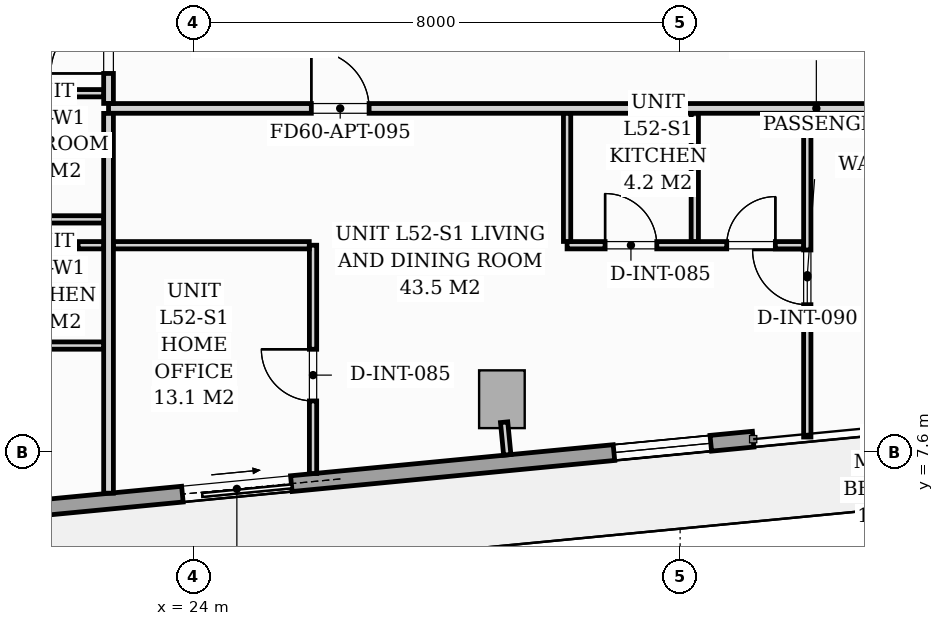
"""IFC4 building model, lengths in metres.
Left out: names, types, materials, properties, quantities, classifications, styles, units other than length and angle.
Written with IfcOpenShell. Run it as: python <this file> out.ifc"""

import sys

from ifc_helpers import new_model, si_unit, direction, frame, frame_2d, origin, origin_2d, place, context, subcontext, project, spatial, rectangle, extrude, source, transform, mapped, element, fill, save


model = new_model("IFC4")
c1 = context("Model", 3, precision=1e-05, world=origin(), true_north=direction((0.0, 1.0)))
c2 = subcontext(c1, "Body", "Model", "MODEL_VIEW")
j1 = project(units=[si_unit("LENGTHUNIT", "METRE"), si_unit("PLANEANGLEUNIT", "RADIAN")], contexts=[c1])
p1 = place(None, origin())
s1 = spatial("IfcSite", under=j1, at=p1, CompositionType="ELEMENT")
p2 = place(p1, origin())
s2 = spatial("IfcBuilding", under=s1, at=p2, CompositionType="ELEMENT")
p3 = place(p2, frame((0.0, 0.0, 182.6)))
s3 = spatial("IfcBuildingStorey", under=s2, at=p3, CompositionType="ELEMENT", Elevation=182.6)
m1 = source(origin(), c2, "Body", "SweptSolid", [
    extrude(rectangle(XDim=0.75, YDim=0.95, at=origin_2d()), origin(), (0.0, 0.0, 1.0), 3.196),
])
p4 = place(p3, frame((29.069, 8.467, 0.002), z_axis=(0.0, 0.0, 1.0), x_axis=(0.995396198367, 0.09584575252, 0.0)))
e1 = element("IfcColumn", 1, at=p4, inside=s3, PredefinedType="COLUMN", context=c2, shape_type="MappedRepresentation", body=[
    mapped(m1, transform((0.0, 0.0, 0.0), scale=1.0)),
])
p5 = place(p3, frame((33.201, 7.81, 0.0), z_axis=(0.0, 0.0, 1.0), x_axis=(-0.995397074604, -0.095836652014, 0.0)))
e2 = element("IfcWall", 2, at=p5, inside=s3, PredefinedType="STANDARD", context=c2, shape_type="SweptSolid", body=[
    extrude(rectangle(XDim=16.1, YDim=0.26, at=frame_2d((8.05, 0.0))), origin(), (0.0, 0.0, 1.0), 2.94),
])
p6 = place(p5, frame((7.63, 0.0, 0.0)))
e3 = element("IfcOpeningElement", 3, at=p6, cuts=e2, PredefinedType="OPENING", context=c2, shape_type="SweptSolid", body=[
    extrude(rectangle(XDim=1.8, YDim=2.06, at=frame_2d((0.9, 1.03))), frame((0.0, 0.14, 0.0), z_axis=(0.0, -1.0, 0.0), x_axis=(1.0, 0.0, 0.0)), (0.0, 0.0, 1.0), 0.28),
])
p7 = place(p5, frame((0.7, 0.0, 0.65)))
e4 = element("IfcOpeningElement", 4, at=p7, cuts=e2, PredefinedType="OPENING", context=c2, shape_type="SweptSolid", body=[
    extrude(rectangle(XDim=1.6, YDim=1.5, at=frame_2d((0.8, 0.75))), frame((0.0, 0.14, 0.0), z_axis=(0.0, -1.0, 0.0), x_axis=(1.0, 0.0, 0.0)), (0.0, 0.0, 1.0), 0.28),
])
p8 = place(p3, frame((22.6, 13.25, 0.0), z_axis=(0.0, 0.0, 1.0), x_axis=(1.0, 0.0, 0.0)))
e5 = element("IfcWall", 5, at=p8, inside=s3, PredefinedType="PARTITIONING", context=c2, shape_type="SweptSolid", body=[
    extrude(rectangle(XDim=23.28, YDim=0.16, at=frame_2d((11.64, 0.0))), origin(), (0.0, 0.0, 1.0), 2.94),
])
p9 = place(p8, frame((3.335, 0.0, 0.0)))
e6 = element("IfcOpeningElement", 6, at=p9, cuts=e5, PredefinedType="OPENING", context=c2, shape_type="SweptSolid", body=[
    extrude(rectangle(XDim=0.95, YDim=2.06, at=frame_2d((0.475, 1.03))), frame((0.0, 0.09, 0.0), z_axis=(0.0, -1.0, 0.0), x_axis=(1.0, 0.0, 0.0)), (0.0, 0.0, 1.0), 0.18),
])
p10 = place(p8, frame((15.096, 0.0, 0.0)))
e7 = element("IfcOpeningElement", 7, at=p10, cuts=e5, PredefinedType="OPENING", context=c2, shape_type="SweptSolid", body=[
    extrude(rectangle(XDim=0.95, YDim=2.06, at=frame_2d((0.475, 1.03))), frame((0.0, 0.09, 0.0), z_axis=(0.0, -1.0, 0.0), x_axis=(1.0, 0.0, 0.0)), (0.0, 0.0, 1.0), 0.18),
])
p11 = place(p3, frame((22.6, 6.922, 0.0), z_axis=(0.0, 0.0, 1.0), x_axis=(0.0, 1.0, 0.0)))
e8 = element("IfcWall", 8, at=p11, inside=s3, PredefinedType="PARTITIONING", context=c2, shape_type="SweptSolid", body=[
    extrude(rectangle(XDim=6.246, YDim=0.16, at=frame_2d((3.123, 0.0))), origin(), (0.0, 0.0, 1.0), 2.94),
])
p12 = place(p3, frame((22.6, 13.332, 0.0), z_axis=(0.0, 0.0, 1.0), x_axis=(0.0, 1.0, 0.0)))
e9 = element("IfcWall", 9, at=p12, inside=s3, PredefinedType="PARTITIONING", context=c2, shape_type="SweptSolid", body=[
    extrude(rectangle(XDim=11.549, YDim=0.16, at=frame_2d((5.774, 0.0))), origin(), (0.0, 0.0, 1.0), 2.94),
])
p13 = place(p12, frame((0.493, 0.0, 0.0)))
e10 = element("IfcOpeningElement", 10, at=p13, cuts=e9, PredefinedType="OPENING", context=c2, shape_type="SweptSolid", body=[
    extrude(rectangle(XDim=0.95, YDim=2.06, at=frame_2d((0.475, 1.03))), frame((0.0, 0.09, 0.0), z_axis=(0.0, -1.0, 0.0), x_axis=(1.0, 0.0, 0.0)), (0.0, 0.0, 1.0), 0.18),
])
p14 = place(p12, frame((4.713, 0.0, 0.0)))
e11 = element("IfcOpeningElement", 11, at=p14, cuts=e9, PredefinedType="OPENING", context=c2, shape_type="SweptSolid", body=[
    extrude(rectangle(XDim=0.95, YDim=2.06, at=frame_2d((0.475, 1.03))), frame((0.0, 0.09, 0.0), z_axis=(0.0, -1.0, 0.0), x_axis=(1.0, 0.0, 0.0)), (0.0, 0.0, 1.0), 0.18),
])
p15 = place(p3, frame((34.091, 7.846, 0.0), z_axis=(0.0, 0.0, 1.0), x_axis=(0.0, 1.0, 0.0)))
e12 = element("IfcWall", 12, at=p15, inside=s3, PredefinedType="PARTITIONING", context=c2, shape_type="SweptSolid", body=[
    extrude(rectangle(XDim=5.322, YDim=0.12, at=frame_2d((2.661, 0.0))), origin(), (0.0, 0.0, 1.0), 2.94),
])
p16 = place(p15, frame((2.176, 0.0, 0.0)))
e13 = element("IfcOpeningElement", 13, at=p16, cuts=e12, PredefinedType="OPENING", context=c2, shape_type="SweptSolid", body=[
    extrude(rectangle(XDim=0.9, YDim=2.05, at=frame_2d((0.45, 1.025))), frame((0.0, 0.07, 0.0), z_axis=(0.0, -1.0, 0.0), x_axis=(1.0, 0.0, 0.0)), (0.0, 0.0, 1.0), 0.14),
])
p17 = place(p3, frame((30.141, 11.0, 0.0), z_axis=(0.0, 0.0, 1.0), x_axis=(1.0, 0.0, 0.0)))
e14 = element("IfcWall", 14, at=p17, inside=s3, PredefinedType="PARTITIONING", context=c2, shape_type="SweptSolid", body=[
    extrude(rectangle(XDim=3.888, YDim=0.12, at=frame_2d((1.944, 0.0))), origin(), (0.0, 0.0, 1.0), 2.94),
])
p18 = place(p17, frame((0.625, 0.0, 0.0)))
e15 = element("IfcOpeningElement", 15, at=p18, cuts=e14, PredefinedType="OPENING", context=c2, shape_type="SweptSolid", body=[
    extrude(rectangle(XDim=0.85, YDim=2.05, at=frame_2d((0.425, 1.025))), frame((0.0, 0.07, 0.0), z_axis=(0.0, -1.0, 0.0), x_axis=(1.0, 0.0, 0.0)), (0.0, 0.0, 1.0), 0.14),
])
p19 = place(p17, frame((2.625, 0.0, 0.0)))
e16 = element("IfcOpeningElement", 16, at=p19, cuts=e14, PredefinedType="OPENING", context=c2, shape_type="SweptSolid", body=[
    extrude(rectangle(XDim=0.8, YDim=2.02, at=frame_2d((0.4, 1.01))), frame((0.0, 0.07, 0.0), z_axis=(0.0, -1.0, 0.0), x_axis=(1.0, 0.0, 0.0)), (0.0, 0.0, 1.0), 0.14),
])
for number, where, z_axis, x_axis in (
    (17, (32.241, 11.062, 0.0), (0.0, 0.0, 1.0), (0.0, 1.0, 0.0)),
    (18, (30.141, 11.062, 0.0), (0.0, 0.0, 1.0), (0.0, 1.0, 0.0)),
):
    element("IfcWall", number, at=place(p3, frame(where, z_axis=z_axis, x_axis=x_axis)), inside=s3, PredefinedType="PARTITIONING", context=c2, shape_type="SweptSolid", body=[
        extrude(rectangle(XDim=2.106, YDim=0.12, at=frame_2d((1.053, 0.0))), origin(), (0.0, 0.0, 1.0), 2.94),
    ])
p20 = place(p3, frame((25.963, 7.246, 0.0), z_axis=(0.0, 0.0, 1.0), x_axis=(0.0, 1.0, 0.0)))
e19 = element("IfcWall", 19, at=p20, inside=s3, PredefinedType="PARTITIONING", context=c2, shape_type="SweptSolid", body=[
    extrude(rectangle(XDim=3.754, YDim=0.12, at=frame_2d((1.877, 0.0))), origin(), (0.0, 0.0, 1.0), 2.94),
])
p21 = place(p20, frame((1.193, 0.0, 0.0)))
e20 = element("IfcOpeningElement", 20, at=p21, cuts=e19, PredefinedType="OPENING", context=c2, shape_type="SweptSolid", body=[
    extrude(rectangle(XDim=0.85, YDim=2.05, at=frame_2d((0.425, 1.025))), frame((0.0, 0.07, 0.0), z_axis=(0.0, -1.0, 0.0), x_axis=(1.0, 0.0, 0.0)), (0.0, 0.0, 1.0), 0.14),
])
p22 = place(p3, frame((22.1, 11.0, 0.0), z_axis=(0.0, 0.0, 1.0), x_axis=(1.0, 0.0, 0.0)))
e21 = element("IfcWall", 21, at=p22, inside=s3, PredefinedType="PARTITIONING", context=c2, shape_type="SweptSolid", body=[
    extrude(rectangle(XDim=0.418, YDim=0.12, at=frame_2d((0.209, 0.0))), origin(), (0.0, 0.0, 1.0), 2.94),
])
p23 = place(p3, frame((22.682, 11.0, 0.0), z_axis=(0.0, 0.0, 1.0), x_axis=(1.0, 0.0, 0.0)))
e22 = element("IfcWall", 22, at=p23, inside=s3, PredefinedType="PARTITIONING", context=c2, shape_type="SweptSolid", body=[
    extrude(rectangle(XDim=3.219, YDim=0.12, at=frame_2d((1.609, 0.0))), origin(), (0.0, 0.0, 1.0), 2.94),
])
for number, where, z_axis, x_axis in (
    (23, (20.262, 11.425, 0.0), (0.0, 0.0, 1.0), (1.0, 0.0, 0.0)),
    (24, (20.262, 9.35, 0.0), (0.0, 0.0, 1.0), (1.0, 0.0, 0.0)),
    (25, (20.262, 13.5, 0.0), (0.0, 0.0, 1.0), (1.0, 0.0, 0.0)),
):
    element("IfcWall", number, at=place(p3, frame(where, z_axis=z_axis, x_axis=x_axis)), inside=s3, PredefinedType="PARTITIONING", context=c2, shape_type="SweptSolid", body=[
        extrude(rectangle(XDim=2.256, YDim=0.12, at=frame_2d((1.128, 0.0))), origin(), (0.0, 0.0, 1.0), 2.94),
    ])
p24 = place(p3, frame((29.105, 8.089, 0.0), z_axis=(0.0, 0.0, 1.0), x_axis=(0.095772948675, -0.995403205893, 0.0)))
e26 = element("IfcWall", 26, at=p24, inside=s3, PredefinedType="PARTITIONING", context=c2, shape_type="SweptSolid", body=[
    extrude(rectangle(XDim=0.538, YDim=0.12, at=frame_2d((0.269, 0.0))), origin(), (0.0, 0.0, 1.0), 2.94),
])
m2 = source(origin(), c2, "Body", "SweptSolid", [
    extrude(rectangle(XDim=1.8, YDim=2.06, at=frame_2d((0.9, 1.03))), frame((0.0, 0.025, 0.0), z_axis=(0.0, -1.0, 0.0), x_axis=(1.0, 0.0, 0.0)), (0.0, 0.0, 1.0), 0.05),
])
p25 = place(p6, origin())
e27 = element("IfcDoor", 27, at=p25, inside=s3, OperationType="SLIDING_TO_LEFT", PredefinedType="DOOR", context=c2, shape_type="MappedRepresentation", body=[
    mapped(m2, transform((0.0, 0.0, 0.0), scale=1.0)),
])
fill(e3, e27)
m3 = source(origin(), c2, "Body", "SweptSolid", [
    extrude(rectangle(XDim=1.6, YDim=1.5, at=frame_2d((0.8, 0.75))), frame((0.0, 0.03, 0.0), z_axis=(0.0, -1.0, 0.0), x_axis=(1.0, 0.0, 0.0)), (0.0, 0.0, 1.0), 0.06),
])
p26 = place(p7, origin())
e28 = element("IfcWindow", 28, at=p26, inside=s3, PartitioningType="SINGLE_PANEL", PredefinedType="WINDOW", context=c2, shape_type="MappedRepresentation", body=[
    mapped(m3, transform((0.0, 0.0, 0.0), scale=1.0)),
])
fill(e4, e28)
m4 = source(origin(), c2, "Body", "SweptSolid", [
    extrude(rectangle(XDim=0.85, YDim=2.05, at=frame_2d((0.425, 1.025))), frame((0.0, 0.025, 0.0), z_axis=(0.0, -1.0, 0.0), x_axis=(1.0, 0.0, 0.0)), (0.0, 0.0, 1.0), 0.05),
])
p27 = place(p21, origin())
e29 = element("IfcDoor", 29, at=p27, inside=s3, OperationType="SINGLE_SWING_RIGHT", PredefinedType="DOOR", context=c2, shape_type="MappedRepresentation", body=[
    mapped(m4, transform((0.0, 0.0, 0.0), scale=1.0)),
])
fill(e20, e29)
m5 = source(origin(), c2, "Body", "SweptSolid", [
    extrude(rectangle(XDim=0.95, YDim=2.06, at=frame_2d((0.475, 1.03))), frame((0.0, 0.025, 0.0), z_axis=(0.0, -1.0, 0.0), x_axis=(1.0, 0.0, 0.0)), (0.0, 0.0, 1.0), 0.05),
])
p28 = place(p9, origin())
e30 = element("IfcDoor", 30, at=p28, inside=s3, OperationType="SINGLE_SWING_LEFT", PredefinedType="DOOR", context=c2, shape_type="MappedRepresentation", body=[
    mapped(m5, transform((0.0, 0.0, 0.0), scale=1.0)),
])
fill(e6, e30)
m6 = source(origin(), c2, "Body", "SweptSolid", [
    extrude(rectangle(XDim=0.9, YDim=2.05, at=frame_2d((0.45, 1.025))), frame((0.0, 0.025, 0.0), z_axis=(0.0, -1.0, 0.0), x_axis=(1.0, 0.0, 0.0)), (0.0, 0.0, 1.0), 0.05),
])
p29 = place(p16, origin())
e31 = element("IfcDoor", 31, at=p29, inside=s3, OperationType="SINGLE_SWING_RIGHT", PredefinedType="DOOR", context=c2, shape_type="MappedRepresentation", body=[
    mapped(m6, transform((0.0, 0.0, 0.0), scale=1.0)),
])
fill(e13, e31)
p30 = place(p18, origin())
e32 = element("IfcDoor", 32, at=p30, inside=s3, OperationType="SINGLE_SWING_LEFT", PredefinedType="DOOR", context=c2, shape_type="MappedRepresentation", body=[
    mapped(m4, transform((0.0, 0.0, 0.0), scale=1.0)),
])
fill(e15, e32)
m7 = source(origin(), c2, "Body", "SweptSolid", [
    extrude(rectangle(XDim=0.8, YDim=2.02, at=frame_2d((0.4, 1.01))), frame((0.0, 0.025, 0.0), z_axis=(0.0, -1.0, 0.0), x_axis=(1.0, 0.0, 0.0)), (0.0, 0.0, 1.0), 0.05),
])
p31 = place(p19, origin())
e33 = element("IfcDoor", 33, at=p31, inside=s3, OperationType="SINGLE_SWING_RIGHT", PredefinedType="DOOR", context=c2, shape_type="MappedRepresentation", body=[
    mapped(m7, transform((0.0, 0.0, 0.0), scale=1.0)),
])
fill(e16, e33)
p32 = place(p13, origin())
e34 = element("IfcDoor", 34, at=p32, inside=s3, OperationType="SINGLE_SWING_LEFT", PredefinedType="DOOR", context=c2, shape_type="MappedRepresentation", body=[
    mapped(m5, transform((0.0, 0.0, 0.0), scale=1.0)),
])
fill(e10, e34)
save(model, sys.argv[1])
